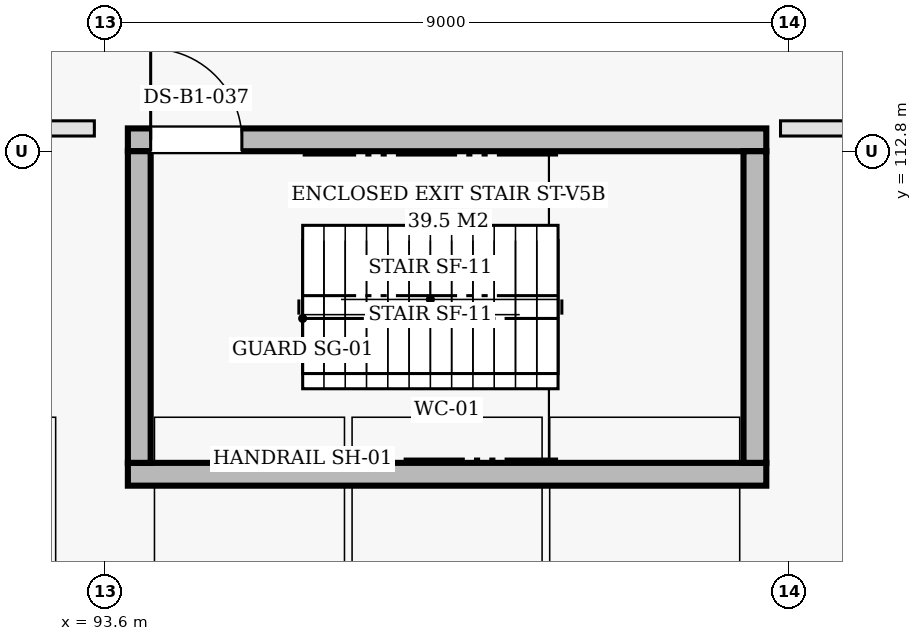
"""IFC4 building model, lengths in metres.
Left out: names, types, materials, properties, quantities, classifications, styles, units other than length and angle.
Written with IfcOpenShell. Run it as: python <this file> out.ifc"""

import sys

from ifc_helpers import new_model, si_unit, direction, frame, frame_2d, origin, place, context, subcontext, project, spatial, rectangle, extrude, element, fill, save


model = new_model("IFC4")
c1 = context("Model", 3, precision=1e-05, world=origin(), true_north=direction((0.0, 1.0)))
c2 = subcontext(c1, "Body", "Model", "MODEL_VIEW")
j1 = project(units=[si_unit("LENGTHUNIT", "METRE"), si_unit("PLANEANGLEUNIT", "RADIAN")], contexts=[c1])
p1 = place(None, origin())
s1 = spatial("IfcSite", under=j1, at=p1, CompositionType="ELEMENT")
p2 = place(p1, origin())
s2 = spatial("IfcBuilding", under=s1, at=p2, CompositionType="ELEMENT")
p3 = place(p2, frame((0.0, 0.0, -4.5)))
s3 = spatial("IfcBuildingStorey", under=s2, at=p3, CompositionType="ELEMENT", Elevation=-4.5)
p4 = place(p3, frame((93.9, 108.55, 0.0), z_axis=(0.0, 0.0, 1.0), x_axis=(1.0, 0.0, 0.0)))
e1 = element("IfcWall", 1, at=p4, inside=s3, PredefinedType="SHEAR", context=c2, shape_type="SweptSolid", body=[
    extrude(rectangle(XDim=8.4, YDim=0.3, at=frame_2d((4.2, 0.0))), origin(), (0.0, 0.0, 1.0), 4.15),
])
p5 = place(p3, frame((93.9, 112.95, 0.0), z_axis=(0.0, 0.0, 1.0), x_axis=(1.0, 0.0, 0.0)))
e2 = element("IfcWall", 2, at=p5, inside=s3, PredefinedType="SHEAR", context=c2, shape_type="SweptSolid", body=[
    extrude(rectangle(XDim=8.4, YDim=0.3, at=frame_2d((4.2, 0.0))), origin(), (0.0, 0.0, 1.0), 4.15),
])
p6 = place(p5, frame((0.3, 0.0, 0.0)))
e3 = element("IfcOpeningElement", 3, at=p6, cuts=e2, PredefinedType="OPENING", context=c2, shape_type="SweptSolid", body=[
    extrude(rectangle(XDim=1.2, YDim=2.15, at=frame_2d((0.6, 1.075))), frame((0.0, 0.16, 0.0), z_axis=(0.0, -1.0, 0.0), x_axis=(1.0, 0.0, 0.0)), (0.0, 0.0, 1.0), 0.32),
])
for number, where, z_axis, x_axis in (
    (4, (94.05, 108.7, 0.0), (0.0, 0.0, 1.0), (0.0, 1.0, 0.0)),
    (5, (102.15, 108.7, 0.0), (0.0, 0.0, 1.0), (0.0, 1.0, 0.0)),
):
    element("IfcWall", number, at=place(p3, frame(where, z_axis=z_axis, x_axis=x_axis)), inside=s3, PredefinedType="SHEAR", context=c2, shape_type="SweptSolid", body=[
        extrude(rectangle(XDim=4.1, YDim=0.3, at=frame_2d((2.05, 0.0))), origin(), (0.0, 0.0, 1.0), 4.15),
    ])
p7 = place(p3, frame((80.146, 113.1, 0.0), z_axis=(0.0, 0.0, 1.0), x_axis=(1.0, 0.0, 0.0)))
e6 = element("IfcWall", 6, at=p7, inside=s3, PredefinedType="PARTITIONING", context=c2, shape_type="SweptSolid", body=[
    extrude(rectangle(XDim=13.313, YDim=0.2, at=frame_2d((6.656, 0.0))), origin(), (0.0, 0.0, 1.0), 3.235),
])
p8 = place(p3, frame((102.487, 113.1, 0.0), z_axis=(0.0, 0.0, 1.0), x_axis=(1.0, 0.0, 0.0)))
e7 = element("IfcWall", 7, at=p8, inside=s3, PredefinedType="PARTITIONING", context=c2, shape_type="SweptSolid", body=[
    extrude(rectangle(XDim=9.493, YDim=0.2, at=frame_2d((4.747, 0.0))), origin(), (0.0, 0.0, 1.0), 3.235),
])
p9 = place(p6, origin())
e8 = element("IfcDoor", 8, at=p9, inside=s3, OperationType="SINGLE_SWING_LEFT", PredefinedType="DOOR", context=c2, shape_type="SweptSolid", body=[
    extrude(rectangle(XDim=1.2, YDim=2.15, at=frame_2d((0.6, 1.075))), frame((0.0, 0.025, 0.0), z_axis=(0.0, -1.0, 0.0), x_axis=(1.0, 0.0, 0.0)), (0.0, 0.0, 1.0), 0.05),
])
fill(e3, e8)
save(model, sys.argv[1])
